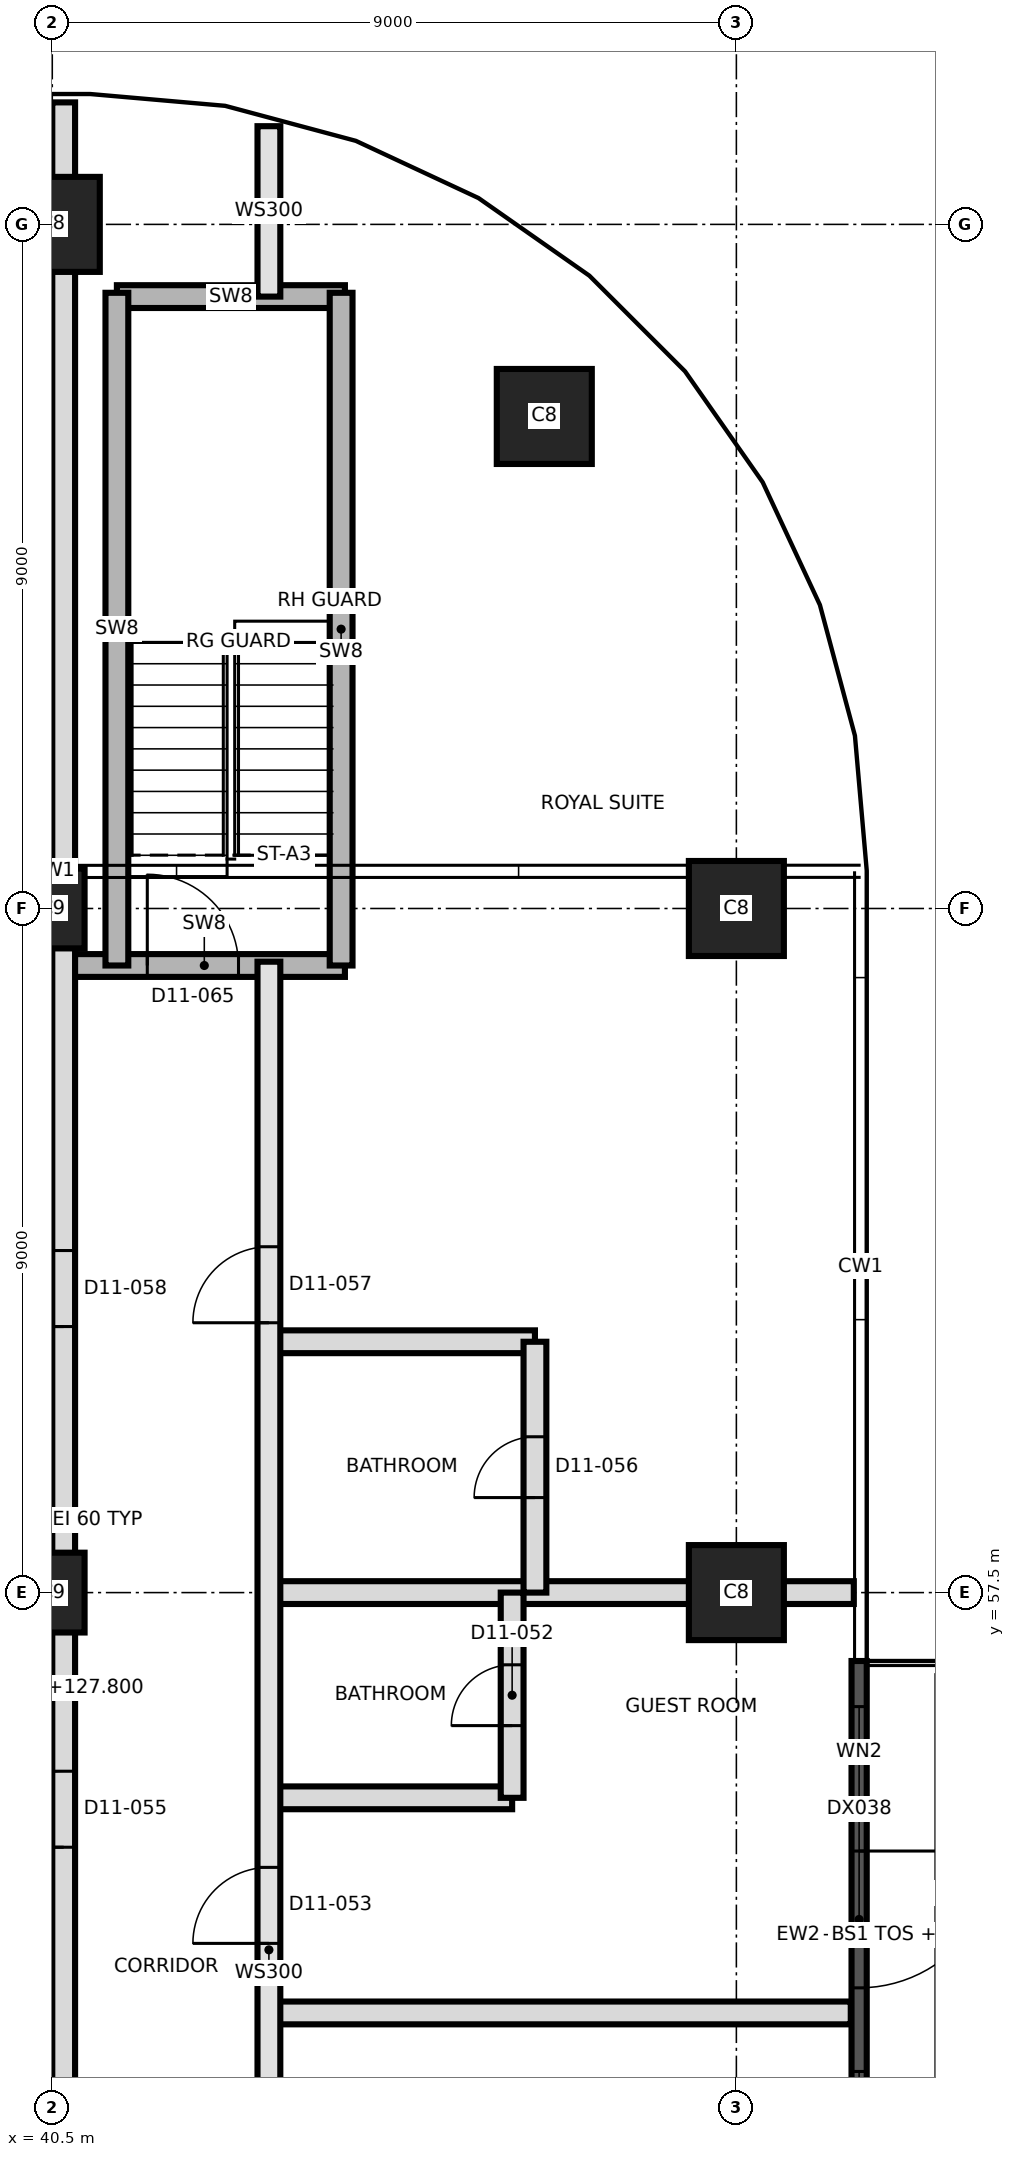
"""IFC4 building model, lengths in metres.
Left out: names, types, materials, properties, quantities, classifications, styles, units other than length and angle.
Written with IfcOpenShell. Run it as: python <this file> out.ifc"""

import sys

from ifc_helpers import new_model, si_unit, direction, frame, frame_2d, origin, origin_2d, place, context, subcontext, project, spatial, rectangle, extrude, element, fill, save


model = new_model("IFC4")
c1 = context("Model", 3, precision=1e-05, world=origin(), true_north=direction((0.0, 1.0)))
c2 = subcontext(c1, "Body", "Model", "MODEL_VIEW")
j1 = project(units=[si_unit("LENGTHUNIT", "METRE"), si_unit("PLANEANGLEUNIT", "RADIAN")], contexts=[c1])
p1 = place(None, origin())
s1 = spatial("IfcSite", under=j1, at=p1, CompositionType="ELEMENT")
p2 = place(p1, origin())
s2 = spatial("IfcBuilding", under=s1, at=p2, CompositionType="ELEMENT")
p3 = place(p2, frame((0.0, 0.0, 127.8)))
s3 = spatial("IfcBuildingStorey", under=s2, at=p3, CompositionType="ELEMENT", Elevation=127.8)
p4 = place(p3, frame((40.5, 57.5, 0.0), z_axis=(0.0, 0.0, 1.0), x_axis=(0.0, 1.0, 0.0)))
e1 = element("IfcColumn", 1, at=p4, inside=s3, PredefinedType="COLUMN", context=c2, shape_type="SweptSolid", body=[
    extrude(rectangle(XDim=1.05, YDim=0.85, at=origin_2d()), origin(), (0.0, 0.0, 1.0), 3.7),
])
p5 = place(p3, frame((49.5, 57.5, 0.0), z_axis=(0.0, 0.0, 1.0), x_axis=(1.0, 0.0, 0.0)))
e2 = element("IfcColumn", 2, at=p5, inside=s3, PredefinedType="COLUMN", context=c2, shape_type="SweptSolid", body=[
    extrude(rectangle(XDim=1.25, YDim=1.25, at=origin_2d()), origin(), (0.0, 0.0, 1.0), 3.7),
])
p6 = place(p3, frame((40.5, 66.5, 0.0), z_axis=(0.0, 0.0, 1.0), x_axis=(0.0, 1.0, 0.0)))
e3 = element("IfcColumn", 3, at=p6, inside=s3, PredefinedType="COLUMN", context=c2, shape_type="SweptSolid", body=[
    extrude(rectangle(XDim=1.05, YDim=0.85, at=origin_2d()), origin(), (0.0, 0.0, 1.0), 3.7),
])
for number, where, z_axis, x_axis in (
    (4, (49.5, 66.5, 0.0), (0.0, 0.0, 1.0), (1.0, 0.0, 0.0)),
    (5, (46.973, 72.973, 0.0), (0.0, 0.0, 1.0), (1.0, 0.0, 0.0)),
    (6, (40.5, 75.5, 0.0), (0.0, 0.0, 1.0), (1.0, 0.0, 0.0)),
):
    element("IfcColumn", number, at=place(p3, frame(where, z_axis=z_axis, x_axis=x_axis)), inside=s3, PredefinedType="COLUMN", context=c2, shape_type="SweptSolid", body=[
        extrude(rectangle(XDim=1.25, YDim=1.25, at=origin_2d()), origin(), (0.0, 0.0, 1.0), 3.7),
    ])
p7 = place(p3, frame((51.115, 56.6, 0.0), z_axis=(0.0, 0.0, 1.0), x_axis=(0.0, -1.0, 0.0)))
e7 = element("IfcWall", 7, at=p7, inside=s3, PredefinedType="SOLIDWALL", context=c2, shape_type="SweptSolid", body=[
    extrude(rectangle(XDim=7.2, YDim=0.2, at=frame_2d((3.6, 0.0))), origin(), (0.0, 0.0, 1.0), 3.4),
])
p8 = place(p7, frame((2.5, 0.0, 0.0)))
e8 = element("IfcOpeningElement", 8, at=p8, cuts=e7, PredefinedType="OPENING", context=c2, shape_type="SweptSolid", body=[
    extrude(rectangle(XDim=1.8, YDim=2.4, at=frame_2d((0.9, 1.2))), frame((0.0, 0.11, 0.0), z_axis=(0.0, -1.0, 0.0), x_axis=(1.0, 0.0, 0.0)), (0.0, 0.0, 1.0), 0.22),
])
p9 = place(p7, frame((5.4, 0.0, 0.9)))
e9 = element("IfcOpeningElement", 9, at=p9, cuts=e7, PredefinedType="OPENING", context=c2, shape_type="SweptSolid", body=[
    extrude(rectangle(XDim=1.2, YDim=2.1, at=frame_2d((0.6, 1.05))), frame((0.0, 0.11, 0.0), z_axis=(0.0, -1.0, 0.0), x_axis=(1.0, 0.0, 0.0)), (0.0, 0.0, 1.0), 0.22),
])
p10 = place(p7, frame((0.6, 0.0, 0.9)))
e10 = element("IfcOpeningElement", 10, at=p10, cuts=e7, PredefinedType="OPENING", context=c2, shape_type="SweptSolid", body=[
    extrude(rectangle(XDim=1.2, YDim=2.1, at=frame_2d((0.6, 1.05))), frame((0.0, 0.11, 0.0), z_axis=(0.0, -1.0, 0.0), x_axis=(1.0, 0.0, 0.0)), (0.0, 0.0, 1.0), 0.22),
])
p11 = place(p3, frame((37.15, 51.8, 0.0), z_axis=(0.0, 0.0, 1.0), x_axis=(1.0, 0.0, 0.0)))
e11 = element("IfcWall", 11, at=p11, inside=s3, PredefinedType="PARTITIONING", context=c2, shape_type="SweptSolid", body=[
    extrude(rectangle(XDim=3.5, YDim=0.3, at=frame_2d((1.75, 0.0))), origin(), (0.0, 0.0, 1.0), 3.4),
])
p12 = place(p3, frame((43.35, 51.97, 0.0), z_axis=(0.0, 0.0, 1.0), x_axis=(1.0, 0.0, 0.0)))
e12 = element("IfcWall", 12, at=p12, inside=s3, PredefinedType="PARTITIONING", context=c2, shape_type="SweptSolid", body=[
    extrude(rectangle(XDim=7.655, YDim=0.3, at=frame_2d((3.827, 0.0))), origin(), (0.0, 0.0, 1.0), 3.4),
])
p13 = place(p3, frame((43.35, 54.8, 0.0), z_axis=(0.0, 0.0, 1.0), x_axis=(1.0, 0.0, 0.0)))
e13 = element("IfcWall", 13, at=p13, inside=s3, PredefinedType="PARTITIONING", context=c2, shape_type="SweptSolid", body=[
    extrude(rectangle(XDim=3.2, YDim=0.3, at=frame_2d((1.6, 0.0))), origin(), (0.0, 0.0, 1.0), 3.4),
])
p14 = place(p3, frame((30.135, 57.5, 0.0), z_axis=(0.0, 0.0, 1.0), x_axis=(1.0, 0.0, 0.0)))
e14 = element("IfcWall", 14, at=p14, inside=s3, PredefinedType="PARTITIONING", context=c2, shape_type="SweptSolid", body=[
    extrude(rectangle(XDim=10.515, YDim=0.3, at=frame_2d((5.257, 0.0))), origin(), (0.0, 0.0, 1.0), 3.4),
])
p15 = place(p3, frame((43.35, 57.5, 0.0), z_axis=(0.0, 0.0, 1.0), x_axis=(1.0, 0.0, 0.0)))
e15 = element("IfcWall", 15, at=p15, inside=s3, PredefinedType="PARTITIONING", context=c2, shape_type="SweptSolid", body=[
    extrude(rectangle(XDim=7.695, YDim=0.3, at=frame_2d((3.847, 0.0))), origin(), (0.0, 0.0, 1.0), 3.4),
])
p16 = place(p3, frame((43.35, 60.8, 0.0), z_axis=(0.0, 0.0, 1.0), x_axis=(1.0, 0.0, 0.0)))
e16 = element("IfcWall", 16, at=p16, inside=s3, PredefinedType="PARTITIONING", context=c2, shape_type="SweptSolid", body=[
    extrude(rectangle(XDim=3.5, YDim=0.3, at=frame_2d((1.75, 0.0))), origin(), (0.0, 0.0, 1.0), 3.4),
])
p17 = place(p3, frame((40.65, 65.75, 0.0), z_axis=(0.0, 0.0, 1.0), x_axis=(1.0, 0.0, 0.0)))
e17 = element("IfcWall", 17, at=p17, inside=s3, PredefinedType="SHEAR", context=c2, shape_type="SweptSolid", body=[
    extrude(rectangle(XDim=3.7, YDim=0.3, at=frame_2d((1.85, 0.0))), origin(), (0.0, 0.0, 1.0), 3.4),
])
p18 = place(p17, frame((1.1, 0.0, 0.0)))
e18 = element("IfcOpeningElement", 18, at=p18, cuts=e17, PredefinedType="OPENING", context=c2, shape_type="SweptSolid", body=[
    extrude(rectangle(XDim=1.2, YDim=2.1, at=frame_2d((0.6, 1.05))), frame((0.0, 0.16, 0.0), z_axis=(0.0, -1.0, 0.0), x_axis=(1.0, 0.0, 0.0)), (0.0, 0.0, 1.0), 0.32),
])
p19 = place(p3, frame((30.944, 71.4, 0.0), z_axis=(0.0, 0.0, 1.0), x_axis=(1.0, 0.0, 0.0)))
e19 = element("IfcWall", 19, at=p19, inside=s3, PredefinedType="PARTITIONING", context=c2, shape_type="SweptSolid", body=[
    extrude(rectangle(XDim=9.706, YDim=0.3, at=frame_2d((4.853, 0.0))), origin(), (0.0, 0.0, 1.0), 3.4),
])
p20 = place(p19, frame((4.056, 0.0, 0.0)))
e20 = element("IfcOpeningElement", 20, at=p20, cuts=e19, PredefinedType="OPENING", context=c2, shape_type="SweptSolid", body=[
    extrude(rectangle(XDim=1.0, YDim=2.1, at=frame_2d((0.5, 1.05))), frame((0.0, 0.16, 0.0), z_axis=(0.0, -1.0, 0.0), x_axis=(1.0, 0.0, 0.0)), (0.0, 0.0, 1.0), 0.32),
])
p21 = place(p3, frame((41.35, 74.55, 0.0), z_axis=(0.0, 0.0, 1.0), x_axis=(1.0, 0.0, 0.0)))
e21 = element("IfcWall", 21, at=p21, inside=s3, PredefinedType="SHEAR", context=c2, shape_type="SweptSolid", body=[
    extrude(rectangle(XDim=3.0, YDim=0.3, at=frame_2d((1.5, 0.0))), origin(), (0.0, 0.0, 1.0), 3.4),
])
p22 = place(p3, frame((37.15, 74.7, 0.0), z_axis=(0.0, 0.0, 1.0), x_axis=(1.0, 0.0, 0.0)))
e22 = element("IfcWall", 22, at=p22, inside=s3, PredefinedType="PARTITIONING", context=c2, shape_type="SweptSolid", body=[
    extrude(rectangle(XDim=3.5, YDim=0.3, at=frame_2d((1.75, 0.0))), origin(), (0.0, 0.0, 1.0), 3.4),
])
p23 = place(p3, frame((40.65, 39.8, 0.0), z_axis=(0.0, 0.0, 1.0), x_axis=(0.0, 1.0, 0.0)))
e23 = element("IfcWall", 23, at=p23, inside=s3, PredefinedType="PARTITIONING", context=c2, shape_type="SweptSolid", body=[
    extrude(rectangle(XDim=37.305, YDim=0.3, at=frame_2d((18.652, 0.0))), origin(), (0.0, 0.0, 1.0), 3.4),
])
p24 = place(p23, frame((0.85, 0.0, 0.0)))
e24 = element("IfcOpeningElement", 24, at=p24, cuts=e23, PredefinedType="OPENING", context=c2, shape_type="SweptSolid", body=[
    extrude(rectangle(XDim=1.0, YDim=2.1, at=frame_2d((0.5, 1.05))), frame((0.0, 0.16, 0.0), z_axis=(0.0, -1.0, 0.0), x_axis=(1.0, 0.0, 0.0)), (0.0, 0.0, 1.0), 0.32),
])
p25 = place(p23, frame((6.7, 0.0, 0.0)))
e25 = element("IfcOpeningElement", 25, at=p25, cuts=e23, PredefinedType="OPENING", context=c2, shape_type="SweptSolid", body=[
    extrude(rectangle(XDim=1.0, YDim=2.1, at=frame_2d((0.5, 1.05))), frame((0.0, 0.16, 0.0), z_axis=(0.0, -1.0, 0.0), x_axis=(1.0, 0.0, 0.0)), (0.0, 0.0, 1.0), 0.32),
])
p26 = place(p23, frame((14.35, 0.0, 0.0)))
e26 = element("IfcOpeningElement", 26, at=p26, cuts=e23, PredefinedType="OPENING", context=c2, shape_type="SweptSolid", body=[
    extrude(rectangle(XDim=1.0, YDim=2.4, at=frame_2d((0.5, 1.2))), frame((0.0, 0.16, 0.0), z_axis=(0.0, -1.0, 0.0), x_axis=(1.0, 0.0, 0.0)), (0.0, 0.0, 1.0), 0.32),
])
p27 = place(p23, frame((21.2, 0.0, 0.0)))
e27 = element("IfcOpeningElement", 27, at=p27, cuts=e23, PredefinedType="OPENING", context=c2, shape_type="SweptSolid", body=[
    extrude(rectangle(XDim=1.0, YDim=2.4, at=frame_2d((0.5, 1.2))), frame((0.0, 0.16, 0.0), z_axis=(0.0, -1.0, 0.0), x_axis=(1.0, 0.0, 0.0)), (0.0, 0.0, 1.0), 0.32),
])
p28 = place(p3, frame((41.35, 65.75, 0.0), z_axis=(0.0, 0.0, 1.0), x_axis=(0.0, 1.0, 0.0)))
e28 = element("IfcWall", 28, at=p28, inside=s3, PredefinedType="SHEAR", context=c2, shape_type="SweptSolid", body=[
    extrude(rectangle(XDim=8.85, YDim=0.3, at=frame_2d((4.425, 0.0))), origin(), (0.0, 0.0, 1.0), 3.4),
])
p29 = place(p3, frame((43.35, 39.8, 0.0), z_axis=(0.0, 0.0, 1.0), x_axis=(0.0, 1.0, 0.0)))
e29 = element("IfcWall", 29, at=p29, inside=s3, PredefinedType="SOLIDWALL", context=c2, shape_type="SweptSolid", body=[
    extrude(rectangle(XDim=26.0, YDim=0.3, at=frame_2d((13.0, 0.0))), origin(), (0.0, 0.0, 1.0), 3.4),
])
p30 = place(p29, frame((1.4, 0.0, 0.0)))
e30 = element("IfcOpeningElement", 30, at=p30, cuts=e29, PredefinedType="OPENING", context=c2, shape_type="SweptSolid", body=[
    extrude(rectangle(XDim=1.2, YDim=2.1, at=frame_2d((0.6, 1.05))), frame((0.0, 0.16, 0.0), z_axis=(0.0, -1.0, 0.0), x_axis=(1.0, 0.0, 0.0)), (0.0, 0.0, 1.0), 0.32),
])
p31 = place(p29, frame((4.65, 0.0, 0.0)))
e31 = element("IfcOpeningElement", 31, at=p31, cuts=e29, PredefinedType="OPENING", context=c2, shape_type="SweptSolid", body=[
    extrude(rectangle(XDim=1.0, YDim=2.1, at=frame_2d((0.5, 1.05))), frame((0.0, 0.16, 0.0), z_axis=(0.0, -1.0, 0.0), x_axis=(1.0, 0.0, 0.0)), (0.0, 0.0, 1.0), 0.32),
])
p32 = place(p29, frame((9.835, 0.0, 0.0)))
e32 = element("IfcOpeningElement", 32, at=p32, cuts=e29, PredefinedType="OPENING", context=c2, shape_type="SweptSolid", body=[
    extrude(rectangle(XDim=1.2, YDim=2.1, at=frame_2d((0.6, 1.05))), frame((0.0, 0.16, 0.0), z_axis=(0.0, -1.0, 0.0), x_axis=(1.0, 0.0, 0.0)), (0.0, 0.0, 1.0), 0.32),
])
p33 = place(p29, frame((13.085, 0.0, 0.0)))
e33 = element("IfcOpeningElement", 33, at=p33, cuts=e29, PredefinedType="OPENING", context=c2, shape_type="SweptSolid", body=[
    extrude(rectangle(XDim=1.0, YDim=2.1, at=frame_2d((0.5, 1.05))), frame((0.0, 0.16, 0.0), z_axis=(0.0, -1.0, 0.0), x_axis=(1.0, 0.0, 0.0)), (0.0, 0.0, 1.0), 0.32),
])
p34 = place(p29, frame((21.25, 0.0, 0.0)))
e34 = element("IfcOpeningElement", 34, at=p34, cuts=e29, PredefinedType="OPENING", context=c2, shape_type="SweptSolid", body=[
    extrude(rectangle(XDim=1.0, YDim=2.4, at=frame_2d((0.5, 1.2))), frame((0.0, 0.16, 0.0), z_axis=(0.0, -1.0, 0.0), x_axis=(1.0, 0.0, 0.0)), (0.0, 0.0, 1.0), 0.32),
])
p35 = place(p3, frame((43.35, 74.55, 0.0), z_axis=(0.0, 0.0, 1.0), x_axis=(0.0, 1.0, 0.0)))
e35 = element("IfcWall", 35, at=p35, inside=s3, PredefinedType="SOLIDWALL", context=c2, shape_type="SweptSolid", body=[
    extrude(rectangle(XDim=2.242, YDim=0.3, at=frame_2d((1.121, 0.0))), origin(), (0.0, 0.0, 1.0), 3.4),
])
p36 = place(p3, frame((44.3, 65.75, 0.0), z_axis=(0.0, 0.0, 1.0), x_axis=(0.0, 1.0, 0.0)))
e36 = element("IfcWall", 36, at=p36, inside=s3, PredefinedType="SHEAR", context=c2, shape_type="SweptSolid", body=[
    extrude(rectangle(XDim=8.85, YDim=0.3, at=frame_2d((4.425, 0.0))), origin(), (0.0, 0.0, 1.0), 3.4),
])
p37 = place(p3, frame((46.55, 54.8, 0.0), z_axis=(0.0, 0.0, 1.0), x_axis=(0.0, 1.0, 0.0)))
e37 = element("IfcWall", 37, at=p37, inside=s3, PredefinedType="PARTITIONING", context=c2, shape_type="SweptSolid", body=[
    extrude(rectangle(XDim=2.7, YDim=0.3, at=frame_2d((1.35, 0.0))), origin(), (0.0, 0.0, 1.0), 3.4),
])
p38 = place(p37, frame((0.95, 0.0, 0.0)))
e38 = element("IfcOpeningElement", 38, at=p38, cuts=e37, PredefinedType="OPENING", context=c2, shape_type="SweptSolid", body=[
    extrude(rectangle(XDim=0.8, YDim=2.1, at=frame_2d((0.4, 1.05))), frame((0.0, 0.16, 0.0), z_axis=(0.0, -1.0, 0.0), x_axis=(1.0, 0.0, 0.0)), (0.0, 0.0, 1.0), 0.32),
])
p39 = place(p3, frame((46.85, 57.5, 0.0), z_axis=(0.0, 0.0, 1.0), x_axis=(0.0, 1.0, 0.0)))
e39 = element("IfcWall", 39, at=p39, inside=s3, PredefinedType="PARTITIONING", context=c2, shape_type="SweptSolid", body=[
    extrude(rectangle(XDim=3.3, YDim=0.3, at=frame_2d((1.65, 0.0))), origin(), (0.0, 0.0, 1.0), 3.4),
])
p40 = place(p39, frame((1.25, 0.0, 0.0)))
e40 = element("IfcOpeningElement", 40, at=p40, cuts=e39, PredefinedType="OPENING", context=c2, shape_type="SweptSolid", body=[
    extrude(rectangle(XDim=0.8, YDim=2.1, at=frame_2d((0.4, 1.05))), frame((0.0, 0.16, 0.0), z_axis=(0.0, -1.0, 0.0), x_axis=(1.0, 0.0, 0.0)), (0.0, 0.0, 1.0), 0.32),
])
p41 = place(p8, origin())
e41 = element("IfcDoor", 41, at=p41, inside=s3, OperationType="SINGLE_SWING_LEFT", PredefinedType="DOOR", context=c2, shape_type="SweptSolid", body=[
    extrude(rectangle(XDim=1.8, YDim=2.4, at=frame_2d((0.9, 1.2))), frame((0.0, 0.025, 0.0), z_axis=(0.0, -1.0, 0.0), x_axis=(1.0, 0.0, 0.0)), (0.0, 0.0, 1.0), 0.05),
])
fill(e8, e41)
p42 = place(p9, origin())
e42 = element("IfcWindow", 42, at=p42, inside=s3, PartitioningType="SINGLE_PANEL", PredefinedType="WINDOW", context=c2, shape_type="SweptSolid", body=[
    extrude(rectangle(XDim=1.2, YDim=2.1, at=frame_2d((0.6, 1.05))), frame((0.0, 0.03, 0.0), z_axis=(0.0, -1.0, 0.0), x_axis=(1.0, 0.0, 0.0)), (0.0, 0.0, 1.0), 0.06),
])
fill(e9, e42)
p43 = place(p10, origin())
e43 = element("IfcWindow", 43, at=p43, inside=s3, PartitioningType="SINGLE_PANEL", PredefinedType="WINDOW", context=c2, shape_type="SweptSolid", body=[
    extrude(rectangle(XDim=1.2, YDim=2.1, at=frame_2d((0.6, 1.05))), frame((0.0, 0.03, 0.0), z_axis=(0.0, -1.0, 0.0), x_axis=(1.0, 0.0, 0.0)), (0.0, 0.0, 1.0), 0.06),
])
fill(e10, e43)
p44 = place(p38, origin())
e44 = element("IfcDoor", 44, at=p44, inside=s3, OperationType="SINGLE_SWING_RIGHT", PredefinedType="DOOR", context=c2, shape_type="SweptSolid", body=[
    extrude(rectangle(XDim=0.8, YDim=2.1, at=frame_2d((0.4, 1.05))), frame((0.0, 0.025, 0.0), z_axis=(0.0, -1.0, 0.0), x_axis=(1.0, 0.0, 0.0)), (0.0, 0.0, 1.0), 0.05),
])
fill(e38, e44)
p45 = place(p33, origin())
e45 = element("IfcDoor", 45, at=p45, inside=s3, OperationType="SINGLE_SWING_LEFT", PredefinedType="DOOR", context=c2, shape_type="SweptSolid", body=[
    extrude(rectangle(XDim=1.0, YDim=2.1, at=frame_2d((0.5, 1.05))), frame((0.0, 0.025, 0.0), z_axis=(0.0, -1.0, 0.0), x_axis=(1.0, 0.0, 0.0)), (0.0, 0.0, 1.0), 0.05),
])
fill(e33, e45)
p46 = place(p26, origin())
e46 = element("IfcDoor", 46, at=p46, inside=s3, OperationType="SINGLE_SWING_LEFT", PredefinedType="DOOR", context=c2, shape_type="SweptSolid", body=[
    extrude(rectangle(XDim=1.0, YDim=2.4, at=frame_2d((0.5, 1.2))), frame((0.0, 0.025, 0.0), z_axis=(0.0, -1.0, 0.0), x_axis=(1.0, 0.0, 0.0)), (0.0, 0.0, 1.0), 0.05),
])
fill(e26, e46)
p47 = place(p40, origin())
e47 = element("IfcDoor", 47, at=p47, inside=s3, OperationType="SINGLE_SWING_LEFT", PredefinedType="DOOR", context=c2, shape_type="SweptSolid", body=[
    extrude(rectangle(XDim=0.8, YDim=2.1, at=frame_2d((0.4, 1.05))), frame((0.0, 0.025, 0.0), z_axis=(0.0, -1.0, 0.0), x_axis=(1.0, 0.0, 0.0)), (0.0, 0.0, 1.0), 0.05),
])
fill(e40, e47)
p48 = place(p34, origin())
e48 = element("IfcDoor", 48, at=p48, inside=s3, OperationType="SINGLE_SWING_RIGHT", PredefinedType="DOOR", context=c2, shape_type="SweptSolid", body=[
    extrude(rectangle(XDim=1.0, YDim=2.4, at=frame_2d((0.5, 1.2))), frame((0.0, 0.025, 0.0), z_axis=(0.0, -1.0, 0.0), x_axis=(1.0, 0.0, 0.0)), (0.0, 0.0, 1.0), 0.05),
])
fill(e34, e48)
p49 = place(p27, origin())
e49 = element("IfcDoor", 49, at=p49, inside=s3, OperationType="SINGLE_SWING_LEFT", PredefinedType="DOOR", context=c2, shape_type="SweptSolid", body=[
    extrude(rectangle(XDim=1.0, YDim=2.4, at=frame_2d((0.5, 1.2))), frame((0.0, 0.025, 0.0), z_axis=(0.0, -1.0, 0.0), x_axis=(1.0, 0.0, 0.0)), (0.0, 0.0, 1.0), 0.05),
])
fill(e27, e49)
p50 = place(p18, origin())
e50 = element("IfcDoor", 50, at=p50, inside=s3, OperationType="SINGLE_SWING_RIGHT", PredefinedType="DOOR", context=c2, shape_type="SweptSolid", body=[
    extrude(rectangle(XDim=1.2, YDim=2.1, at=frame_2d((0.6, 1.05))), frame((0.0, 0.025, 0.0), z_axis=(0.0, -1.0, 0.0), x_axis=(1.0, 0.0, 0.0)), (0.0, 0.0, 1.0), 0.05),
])
fill(e18, e50)
save(model, sys.argv[1])
